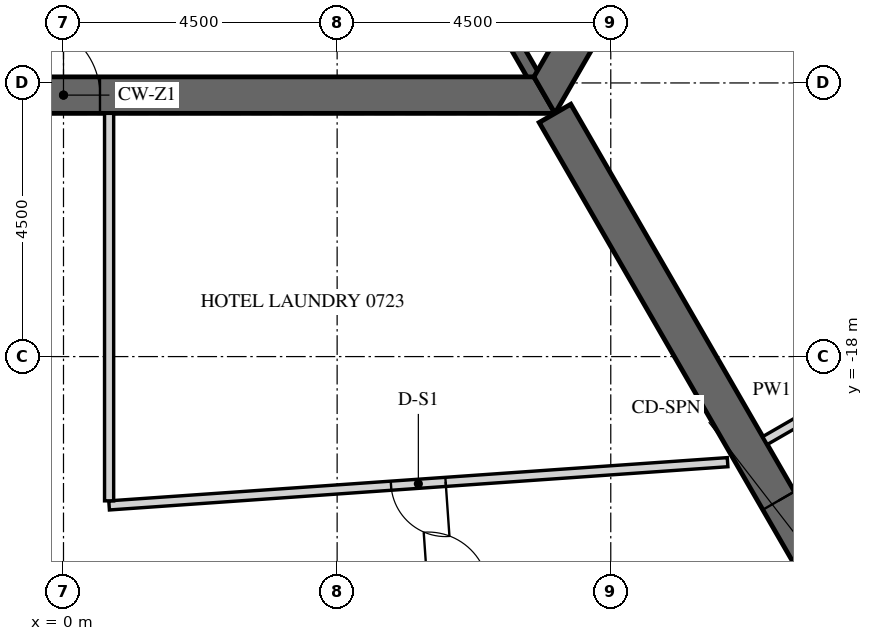
"""IFC4 building model, lengths in metres.
Left out: names, types, materials, properties, quantities, classifications, styles, units other than length and angle.
Written with IfcOpenShell. Run it as: python <this file> out.ifc"""

import sys

from ifc_helpers import new_model, si_unit, direction, frame, frame_2d, origin, place, context, subcontext, project, spatial, polyline, rectangle, outline, extrude, element, fill, save


model = new_model("IFC4")
c1 = context("Model", 3, precision=1e-05, world=origin(), true_north=direction((0.0, 1.0)))
c2 = subcontext(c1, "Body", "Model", "MODEL_VIEW")
j1 = project(units=[si_unit("LENGTHUNIT", "METRE"), si_unit("PLANEANGLEUNIT", "RADIAN")], contexts=[c1])
p1 = place(None, origin())
s1 = spatial("IfcSite", under=j1, at=p1, CompositionType="ELEMENT")
p2 = place(p1, origin())
s2 = spatial("IfcBuilding", under=s1, at=p2, CompositionType="ELEMENT")
p3 = place(p2, frame((0.0, 0.0, 99.9)))
s3 = spatial("IfcBuildingStorey", under=s2, at=p3, CompositionType="ELEMENT", Elevation=99.9)
p4 = place(p3, frame((-7.91, -13.7, -0.15), z_axis=(0.0, 0.0, 1.0), x_axis=(1.0, 0.0, 0.0)))
e1 = element("IfcWall", 1, at=p4, inside=s3, PredefinedType="SHEAR", context=c2, shape_type="SweptSolid", body=[
    extrude(outline(polyline([(-0.173, -0.3), (15.993, -0.3), (15.646, 0.3), (0.173, 0.3), (-0.173, -0.3)])), origin(), (0.0, 0.0, 1.0), 3.9),
])
p5 = place(p4, frame((7.31, 0.0, 0.15)))
e2 = element("IfcOpeningElement", 2, at=p5, cuts=e1, PredefinedType="OPENING", context=c2, shape_type="SweptSolid", body=[
    extrude(rectangle(XDim=1.2, YDim=2.4, at=frame_2d((0.6, 1.2))), frame((0.0, 0.31, 0.0), z_axis=(0.0, -1.0, 0.0), x_axis=(1.0, 0.0, 0.0)), (0.0, 0.0, 1.0), 0.62),
])
p6 = place(p3, frame((7.91, -13.7, -0.15), z_axis=(0.0, 0.0, 1.0), x_axis=(0.499999880136, 0.866025472988, 0.0)))
e3 = element("IfcWall", 3, at=p6, inside=s3, PredefinedType="SHEAR", context=c2, shape_type="SweptSolid", body=[
    extrude(outline(polyline([(-0.173, -0.3), (15.993, -0.3), (15.646, 0.3), (0.173, 0.3), (-0.173, -0.3)])), origin(), (0.0, 0.0, 1.0), 3.9),
])
p7 = place(p6, frame((7.039, 0.0, 0.15)))
e4 = element("IfcOpeningElement", 4, at=p7, cuts=e3, PredefinedType="OPENING", context=c2, shape_type="SweptSolid", body=[
    extrude(rectangle(XDim=1.8, YDim=2.4, at=frame_2d((0.9, 1.2))), frame((0.0, 0.31, 0.0), z_axis=(0.0, -1.0, 0.0), x_axis=(1.0, 0.0, 0.0)), (0.0, 0.0, 1.0), 0.62),
])
p8 = place(p3, frame((8.083, -14.0, -0.15), z_axis=(0.0, 0.0, 1.0), x_axis=(0.499997680643, -0.866026742862, 0.0)))
e5 = element("IfcWall", 5, at=p8, inside=s3, PredefinedType="SHEAR", context=c2, shape_type="SweptSolid", body=[
    extrude(rectangle(XDim=16.509, YDim=0.6, at=frame_2d((8.254, 0.0))), origin(), (0.0, 0.0, 1.0), 3.9),
])
p9 = place(p8, frame((7.354, 0.0, 0.15)))
e6 = element("IfcOpeningElement", 6, at=p9, cuts=e5, PredefinedType="OPENING", context=c2, shape_type="SweptSolid", body=[
    extrude(rectangle(XDim=1.8, YDim=2.4, at=frame_2d((0.9, 1.2))), frame((0.0, 0.31, 0.0), z_axis=(0.0, -1.0, 0.0), x_axis=(1.0, 0.0, 0.0)), (0.0, 0.0, 1.0), 0.62),
])
p10 = place(p3, frame((5.773, -10.0, -0.15), z_axis=(0.0, 0.0, 1.0), x_axis=(0.500038251005, -0.86600331843, 0.0)))
e7 = element("IfcWall", 7, at=p10, inside=s3, PredefinedType="SHEAR", context=c2, shape_type="SweptSolid", body=[
    extrude(rectangle(XDim=3.926, YDim=0.2, at=frame_2d((1.963, 0.0))), origin(), (0.0, 0.0, 1.0), 3.9),
])
p11 = place(p3, frame((10.921, -19.736, 0.0), z_axis=(0.0, 0.0, 1.0), x_axis=(-0.997564418338, -0.069751209779, 0.0)))
e8 = element("IfcWall", 8, at=p11, inside=s3, PredefinedType="PARTITIONING", context=c2, shape_type="SweptSolid", body=[
    extrude(rectangle(XDim=10.196, YDim=0.15, at=frame_2d((5.098, 0.0))), origin(), (0.0, 0.0, 1.0), 2.988),
])
p12 = place(p11, frame((4.648, 0.0, 0.0)))
e9 = element("IfcOpeningElement", 9, at=p12, cuts=e8, PredefinedType="OPENING", context=c2, shape_type="SweptSolid", body=[
    extrude(rectangle(XDim=0.9, YDim=2.1, at=frame_2d((0.45, 1.05))), frame((0.0, 0.085, 0.0), z_axis=(0.0, -1.0, 0.0), x_axis=(1.0, 0.0, 0.0)), (0.0, 0.0, 1.0), 0.17),
])
p13 = place(p3, frame((0.75, -20.372, 0.0), z_axis=(0.0, 0.0, 1.0), x_axis=(0.0, 1.0, 0.0)))
e10 = element("IfcWall", 10, at=p13, inside=s3, PredefinedType="PARTITIONING", context=c2, shape_type="SweptSolid", body=[
    extrude(rectangle(XDim=6.372, YDim=0.15, at=frame_2d((3.186, 0.0))), origin(), (0.0, 0.0, 1.0), 2.988),
])
p14 = place(p3, frame((12.738, -18.688, 0.0), z_axis=(0.0, 0.0, 1.0), x_axis=(-0.866080107329, -0.499905238708, 0.0)))
e11 = element("IfcWall", 11, at=p14, inside=s3, PredefinedType="PARTITIONING", context=c2, shape_type="SweptSolid", body=[
    extrude(rectangle(XDim=1.387, YDim=0.15, at=frame_2d((0.694, 0.0))), origin(), (0.0, 0.0, 1.0), 2.988),
])
p15 = place(p5, origin())
e12 = element("IfcDoor", 12, at=p15, inside=s3, OperationType="SINGLE_SWING_LEFT", PredefinedType="DOOR", context=c2, shape_type="SweptSolid", body=[
    extrude(rectangle(XDim=1.2, YDim=2.4, at=frame_2d((0.6, 1.2))), frame((0.0, 0.025, 0.0), z_axis=(0.0, -1.0, 0.0), x_axis=(1.0, 0.0, 0.0)), (0.0, 0.0, 1.0), 0.05),
])
fill(e2, e12)
p16 = place(p9, origin())
e13 = element("IfcDoor", 13, at=p16, inside=s3, OperationType="DOUBLE_DOOR_SINGLE_SWING", PredefinedType="DOOR", context=c2, shape_type="SweptSolid", body=[
    extrude(rectangle(XDim=1.8, YDim=2.4, at=frame_2d((0.9, 1.2))), frame((0.0, 0.025, 0.0), z_axis=(0.0, -1.0, 0.0), x_axis=(1.0, 0.0, 0.0)), (0.0, 0.0, 1.0), 0.05),
])
fill(e6, e13)
p17 = place(p12, origin())
e14 = element("IfcDoor", 14, at=p17, inside=s3, OperationType="SINGLE_SWING_LEFT", PredefinedType="DOOR", context=c2, shape_type="SweptSolid", body=[
    extrude(rectangle(XDim=0.9, YDim=2.1, at=frame_2d((0.45, 1.05))), frame((0.0, 0.025, 0.0), z_axis=(0.0, -1.0, 0.0), x_axis=(1.0, 0.0, 0.0)), (0.0, 0.0, 1.0), 0.05),
])
fill(e9, e14)
save(model, sys.argv[1])
